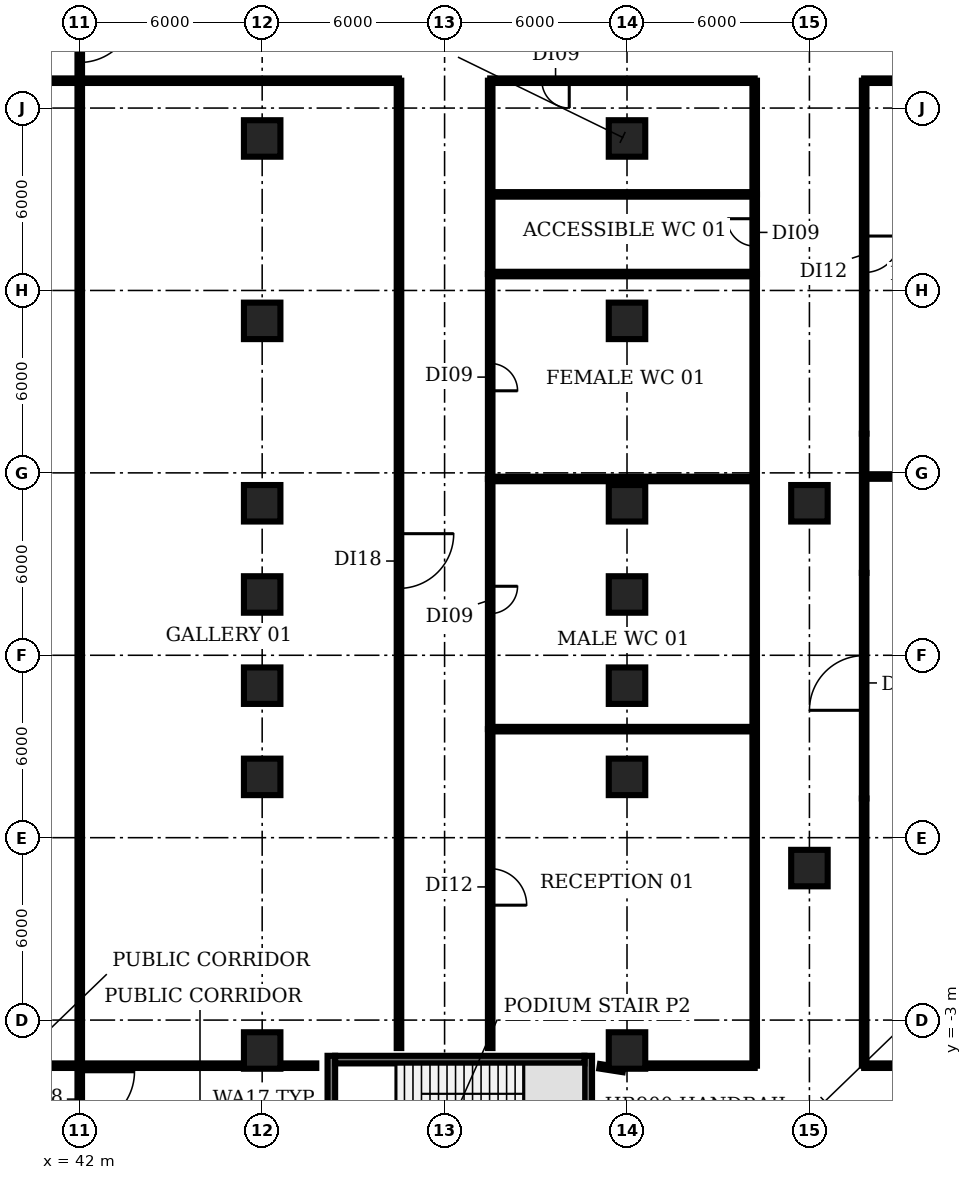
"""IFC4 building model, lengths in metres.
Left out: names, types, materials, properties, quantities, classifications, styles, units other than length and angle.
Written with IfcOpenShell. Run it as: python <this file> out.ifc"""

import sys

from ifc_helpers import new_model, si_unit, direction, frame, frame_2d, origin, origin_2d, place, context, subcontext, project, spatial, rectangle, extrude, element, fill, save


model = new_model("IFC4")
c1 = context("Model", 3, precision=1e-05, world=origin(), true_north=direction((0.0, 1.0)))
c2 = subcontext(c1, "Body", "Model", "MODEL_VIEW")
j1 = project(units=[si_unit("LENGTHUNIT", "METRE"), si_unit("PLANEANGLEUNIT", "RADIAN")], contexts=[c1])
p1 = place(None, origin())
s1 = spatial("IfcSite", under=j1, at=p1, CompositionType="ELEMENT")
p2 = place(p1, origin())
s2 = spatial("IfcBuilding", under=s1, at=p2, CompositionType="ELEMENT")
p3 = place(p2, origin())
s3 = spatial("IfcBuildingStorey", under=s2, at=p3, CompositionType="ELEMENT", Elevation=0.0)
for number, where, z_axis, x_axis in (
    (1, (48.0, -4.0, 0.0), (0.0, 0.0, 1.0), (1.0, 0.0, 0.0)),
    (2, (48.0, 5.0, 0.0), (0.0, 0.0, 1.0), (1.0, 0.0, 0.0)),
    (3, (48.0, 8.0, 0.0), (0.0, 0.0, 1.0), (1.0, 0.0, 0.0)),
    (4, (48.0, 11.0, 0.0), (0.0, 0.0, 1.0), (1.0, 0.0, 0.0)),
    (5, (48.0, 14.0, 0.0), (0.0, 0.0, 1.0), (1.0, 0.0, 0.0)),
    (6, (48.0, 20.0, 0.0), (0.0, 0.0, 1.0), (1.0, 0.0, 0.0)),
    (7, (48.0, 26.0, 0.0), (0.0, 0.0, 1.0), (1.0, 0.0, 0.0)),
    (8, (60.0, -4.0, 0.0), (0.0, 0.0, 1.0), (1.0, 0.0, 0.0)),
    (9, (60.0, 5.0, 0.0), (0.0, 0.0, 1.0), (1.0, 0.0, 0.0)),
    (10, (60.0, 8.0, 0.0), (0.0, 0.0, 1.0), (1.0, 0.0, 0.0)),
    (11, (60.0, 11.0, 0.0), (0.0, 0.0, 1.0), (1.0, 0.0, 0.0)),
    (12, (60.0, 14.0, 0.0), (0.0, 0.0, 1.0), (1.0, 0.0, 0.0)),
    (13, (60.0, 20.0, 0.0), (0.0, 0.0, 1.0), (1.0, 0.0, 0.0)),
    (14, (60.0, 26.0, 0.0), (0.0, 0.0, 1.0), (1.0, 0.0, 0.0)),
    (15, (66.0, 2.0, 0.0), (0.0, 0.0, 1.0), (1.0, 0.0, 0.0)),
    (16, (66.0, 14.0, 0.0), (0.0, 0.0, 1.0), (1.0, 0.0, 0.0)),
):
    element("IfcColumn", number, at=place(p3, frame(where, z_axis=z_axis, x_axis=x_axis)), inside=s3, PredefinedType="COLUMN", context=c2, shape_type="SweptSolid", body=[
        extrude(rectangle(XDim=1.2, YDim=1.2, at=origin_2d()), origin(), (0.0, 0.0, 1.0), 5.65),
    ])
for number, where, z_axis, x_axis in (
    (17, (50.275, -8.825, 0.0), (0.0, 0.0, 1.0), (0.0, 1.0, 0.0)),
    (18, (58.725, -8.825, 0.0), (0.0, 0.0, 1.0), (0.0, 1.0, 0.0)),
):
    element("IfcWall", number, at=place(p3, frame(where, z_axis=z_axis, x_axis=x_axis)), inside=s3, PredefinedType="SHEAR", context=c2, shape_type="SweptSolid", body=[
        extrude(rectangle(XDim=4.65, YDim=0.25, at=frame_2d((2.325, 0.0))), origin(), (0.0, 0.0, 1.0), 5.65),
    ])
p4 = place(p3, frame((50.4, -4.3, 0.0), z_axis=(0.0, 0.0, 1.0), x_axis=(1.0, 0.0, 0.0)))
e19 = element("IfcWall", 19, at=p4, inside=s3, PredefinedType="SHEAR", context=c2, shape_type="SweptSolid", body=[
    extrude(rectangle(XDim=8.2, YDim=0.25, at=frame_2d((4.1, 0.0))), origin(), (0.0, 0.0, 1.0), 5.65),
])
p5 = place(p3, frame((31.5, 27.9, 0.0), z_axis=(0.0, 0.0, 1.0), x_axis=(1.0, 0.0, 0.0)))
e20 = element("IfcWall", 20, at=p5, inside=s3, PredefinedType="PARTITIONING", context=c2, shape_type="SweptSolid", body=[
    extrude(rectangle(XDim=21.0, YDim=0.15, at=frame_2d((10.5, 0.0))), origin(), (0.0, 0.0, 1.0), 4.53),
])
p6 = place(p3, frame((36.46, -4.5, 0.0), z_axis=(0.0, 0.0, 1.0), x_axis=(1.0, 0.0, 0.0)))
e21 = element("IfcWall", 21, at=p6, inside=s3, PredefinedType="PARTITIONING", context=c2, shape_type="SweptSolid", body=[
    extrude(rectangle(XDim=11.08, YDim=0.15, at=frame_2d((5.54, 0.0))), origin(), (0.0, 0.0, 1.0), 4.53),
])
p7 = place(p3, frame((42.0, -4.5, 0.0), z_axis=(0.0, 0.0, 1.0), x_axis=(0.0, -1.0, 0.0)))
e22 = element("IfcWall", 22, at=p7, inside=s3, PredefinedType="PARTITIONING", context=c2, shape_type="SweptSolid", body=[
    extrude(rectangle(XDim=2.2, YDim=0.15, at=frame_2d((1.1, 0.0))), origin(), (0.0, 0.0, 1.0), 4.53),
])
p8 = place(p7, frame((0.2, 0.0, 0.0)))
e23 = element("IfcOpeningElement", 23, at=p8, cuts=e22, PredefinedType="OPENING", context=c2, shape_type="SweptSolid", body=[
    extrude(rectangle(XDim=1.8, YDim=2.1, at=frame_2d((0.9, 1.05))), frame((0.0, 0.085, 0.0), z_axis=(0.0, -1.0, 0.0), x_axis=(1.0, 0.0, 0.0)), (0.0, 0.0, 1.0), 0.17),
])
p9 = place(p3, frame((42.0, -4.5, 0.0), z_axis=(0.0, 0.0, 1.0), x_axis=(0.0, 1.0, 0.0)))
e24 = element("IfcWall", 24, at=p9, inside=s3, PredefinedType="PARTITIONING", context=c2, shape_type="SweptSolid", body=[
    extrude(rectangle(XDim=32.4, YDim=0.15, at=frame_2d((16.2, 0.0))), origin(), (0.0, 0.0, 1.0), 4.53),
])
p10 = place(p3, frame((42.0, 30.9, 0.0), z_axis=(0.0, 0.0, 1.0), x_axis=(0.0, -1.0, 0.0)))
e25 = element("IfcWall", 25, at=p10, inside=s3, PredefinedType="PARTITIONING", context=c2, shape_type="SweptSolid", body=[
    extrude(rectangle(XDim=3.0, YDim=0.15, at=frame_2d((1.5, 0.0))), origin(), (0.0, 0.0, 1.0), 4.53),
])
p11 = place(p10, frame((0.6, 0.0, 0.0)))
e26 = element("IfcOpeningElement", 26, at=p11, cuts=e25, PredefinedType="OPENING", context=c2, shape_type="SweptSolid", body=[
    extrude(rectangle(XDim=1.8, YDim=2.1, at=frame_2d((0.9, 1.05))), frame((0.0, 0.085, 0.0), z_axis=(0.0, -1.0, 0.0), x_axis=(1.0, 0.0, 0.0)), (0.0, 0.0, 1.0), 0.17),
])
p12 = place(p3, frame((48.46, -4.5, 0.0), z_axis=(0.0, 0.0, 1.0), x_axis=(1.0, 0.0, 0.0)))
e27 = element("IfcWall", 27, at=p12, inside=s3, PredefinedType="PARTITIONING", context=c2, shape_type="SweptSolid", body=[
    extrude(rectangle(XDim=1.32, YDim=0.15, at=frame_2d((0.66, 0.0))), origin(), (0.0, 0.0, 1.0), 4.53),
])
p13 = place(p3, frame((52.5, 27.9, 0.0), z_axis=(0.0, 0.0, 1.0), x_axis=(0.0, -1.0, 0.0)))
e28 = element("IfcWall", 28, at=p13, inside=s3, PredefinedType="PARTITIONING", context=c2, shape_type="SweptSolid", body=[
    extrude(rectangle(XDim=31.82, YDim=0.15, at=frame_2d((15.91, 0.0))), origin(), (0.0, 0.0, 1.0), 4.53),
])
p14 = place(p13, frame((14.9, 0.0, 0.0)))
e29 = element("IfcOpeningElement", 29, at=p14, cuts=e28, PredefinedType="OPENING", context=c2, shape_type="SweptSolid", body=[
    extrude(rectangle(XDim=1.8, YDim=2.1, at=frame_2d((0.9, 1.05))), frame((0.0, 0.085, 0.0), z_axis=(0.0, -1.0, 0.0), x_axis=(1.0, 0.0, 0.0)), (0.0, 0.0, 1.0), 0.17),
])
p15 = place(p3, frame((55.5, 6.57, 0.0), z_axis=(0.0, 0.0, 1.0), x_axis=(0.0, -1.0, 0.0)))
e30 = element("IfcWall", 30, at=p15, inside=s3, PredefinedType="PARTITIONING", context=c2, shape_type="SweptSolid", body=[
    extrude(rectangle(XDim=10.49, YDim=0.15, at=frame_2d((5.245, 0.0))), origin(), (0.0, 0.0, 1.0), 4.53),
])
p16 = place(p15, frame((4.59, 0.0, 0.0)))
e31 = element("IfcOpeningElement", 31, at=p16, cuts=e30, PredefinedType="OPENING", context=c2, shape_type="SweptSolid", body=[
    extrude(rectangle(XDim=1.2, YDim=2.1, at=frame_2d((0.6, 1.05))), frame((0.0, 0.085, 0.0), z_axis=(0.0, -1.0, 0.0), x_axis=(1.0, 0.0, 0.0)), (0.0, 0.0, 1.0), 0.17),
])
p17 = place(p3, frame((55.5, 6.57, 0.0), z_axis=(0.0, 0.0, 1.0), x_axis=(1.0, 0.0, 0.0)))
e32 = element("IfcWall", 32, at=p17, inside=s3, PredefinedType="PARTITIONING", context=c2, shape_type="SweptSolid", body=[
    extrude(rectangle(XDim=8.7, YDim=0.15, at=frame_2d((4.35, 0.0))), origin(), (0.0, 0.0, 1.0), 4.53),
])
p18 = place(p3, frame((55.5, 14.8, 0.0), z_axis=(0.0, 0.0, 1.0), x_axis=(0.0, -1.0, 0.0)))
e33 = element("IfcWall", 33, at=p18, inside=s3, PredefinedType="PARTITIONING", context=c2, shape_type="SweptSolid", body=[
    extrude(rectangle(XDim=8.23, YDim=0.15, at=frame_2d((4.115, 0.0))), origin(), (0.0, 0.0, 1.0), 4.53),
])
p19 = place(p18, frame((3.53, 0.0, 0.0)))
e34 = element("IfcOpeningElement", 34, at=p19, cuts=e33, PredefinedType="OPENING", context=c2, shape_type="SweptSolid", body=[
    extrude(rectangle(XDim=0.9, YDim=2.1, at=frame_2d((0.45, 1.05))), frame((0.0, 0.085, 0.0), z_axis=(0.0, -1.0, 0.0), x_axis=(1.0, 0.0, 0.0)), (0.0, 0.0, 1.0), 0.17),
])
p20 = place(p3, frame((55.5, 14.8, 0.0), z_axis=(0.0, 0.0, 1.0), x_axis=(1.0, 0.0, 0.0)))
e35 = element("IfcWall", 35, at=p20, inside=s3, PredefinedType="PARTITIONING", context=c2, shape_type="SweptSolid", body=[
    extrude(rectangle(XDim=8.7, YDim=0.15, at=frame_2d((4.35, 0.0))), origin(), (0.0, 0.0, 1.0), 4.53),
])
p21 = place(p3, frame((55.5, 21.54, 0.0), z_axis=(0.0, 0.0, 1.0), x_axis=(0.0, -1.0, 0.0)))
e36 = element("IfcWall", 36, at=p21, inside=s3, PredefinedType="PARTITIONING", context=c2, shape_type="SweptSolid", body=[
    extrude(rectangle(XDim=6.74, YDim=0.15, at=frame_2d((3.37, 0.0))), origin(), (0.0, 0.0, 1.0), 4.53),
])
p22 = place(p21, frame((2.94, 0.0, 0.0)))
e37 = element("IfcOpeningElement", 37, at=p22, cuts=e36, PredefinedType="OPENING", context=c2, shape_type="SweptSolid", body=[
    extrude(rectangle(XDim=0.9, YDim=2.1, at=frame_2d((0.45, 1.05))), frame((0.0, 0.085, 0.0), z_axis=(0.0, -1.0, 0.0), x_axis=(1.0, 0.0, 0.0)), (0.0, 0.0, 1.0), 0.17),
])
p23 = place(p3, frame((55.5, 21.54, 0.0), z_axis=(0.0, 0.0, 1.0), x_axis=(0.0, 1.0, 0.0)))
e38 = element("IfcWall", 38, at=p23, inside=s3, PredefinedType="PARTITIONING", context=c2, shape_type="SweptSolid", body=[
    extrude(rectangle(XDim=6.36, YDim=0.15, at=frame_2d((3.18, 0.0))), origin(), (0.0, 0.0, 1.0), 4.53),
])
for number, where, z_axis, x_axis in (
    (39, (55.5, 21.54, 0.0), (0.0, 0.0, 1.0), (1.0, 0.0, 0.0)),
    (40, (55.5, 24.16, 0.0), (0.0, 0.0, 1.0), (1.0, 0.0, 0.0)),
):
    element("IfcWall", number, at=place(p3, frame(where, z_axis=z_axis, x_axis=x_axis)), inside=s3, PredefinedType="PARTITIONING", context=c2, shape_type="SweptSolid", body=[
        extrude(rectangle(XDim=8.7, YDim=0.15, at=frame_2d((4.35, 0.0))), origin(), (0.0, 0.0, 1.0), 4.53),
    ])
p24 = place(p3, frame((59.1, -4.52, 0.0), z_axis=(0.0, 0.0, 1.0), x_axis=(0.988098486873, -0.153822560892, 0.0)))
e41 = element("IfcWall", 41, at=p24, inside=s3, PredefinedType="PARTITIONING", context=c2, shape_type="SweptSolid", body=[
    extrude(rectangle(XDim=0.779, YDim=0.15, at=frame_2d((0.39, 0.0))), origin(), (0.0, 0.0, 1.0), 4.53),
])
p25 = place(p3, frame((60.46, -4.5, 0.0), z_axis=(0.0, 0.0, 1.0), x_axis=(1.0, 0.0, 0.0)))
e42 = element("IfcWall", 42, at=p25, inside=s3, PredefinedType="PARTITIONING", context=c2, shape_type="SweptSolid", body=[
    extrude(rectangle(XDim=3.74, YDim=0.15, at=frame_2d((1.87, 0.0))), origin(), (0.0, 0.0, 1.0), 4.53),
])
p26 = place(p3, frame((64.2, -4.5, 0.0), z_axis=(0.0, 0.0, 1.0), x_axis=(0.0, 1.0, 0.0)))
e43 = element("IfcWall", 43, at=p26, inside=s3, PredefinedType="PARTITIONING", context=c2, shape_type="SweptSolid", body=[
    extrude(rectangle(XDim=26.04, YDim=0.15, at=frame_2d((13.02, 0.0))), origin(), (0.0, 0.0, 1.0), 4.53),
])
p27 = place(p3, frame((64.2, 21.54, 0.0), z_axis=(0.0, 0.0, 1.0), x_axis=(0.0, 1.0, 0.0)))
e44 = element("IfcWall", 44, at=p27, inside=s3, PredefinedType="PARTITIONING", context=c2, shape_type="SweptSolid", body=[
    extrude(rectangle(XDim=2.62, YDim=0.15, at=frame_2d((1.31, 0.0))), origin(), (0.0, 0.0, 1.0), 4.53),
])
p28 = place(p27, frame((0.92, 0.0, 0.0)))
e45 = element("IfcOpeningElement", 45, at=p28, cuts=e44, PredefinedType="OPENING", context=c2, shape_type="SweptSolid", body=[
    extrude(rectangle(XDim=0.9, YDim=2.1, at=frame_2d((0.45, 1.05))), frame((0.0, 0.085, 0.0), z_axis=(0.0, -1.0, 0.0), x_axis=(1.0, 0.0, 0.0)), (0.0, 0.0, 1.0), 0.17),
])
p29 = place(p3, frame((64.2, 24.16, 0.0), z_axis=(0.0, 0.0, 1.0), x_axis=(0.0, 1.0, 0.0)))
e46 = element("IfcWall", 46, at=p29, inside=s3, PredefinedType="PARTITIONING", context=c2, shape_type="SweptSolid", body=[
    extrude(rectangle(XDim=3.74, YDim=0.15, at=frame_2d((1.87, 0.0))), origin(), (0.0, 0.0, 1.0), 4.53),
])
p30 = place(p3, frame((64.2, 27.9, 0.0), z_axis=(0.0, 0.0, 1.0), x_axis=(-1.0, 0.0, 0.0)))
e47 = element("IfcWall", 47, at=p30, inside=s3, PredefinedType="PARTITIONING", context=c2, shape_type="SweptSolid", body=[
    extrude(rectangle(XDim=8.7, YDim=0.15, at=frame_2d((4.35, 0.0))), origin(), (0.0, 0.0, 1.0), 4.53),
])
p31 = place(p30, frame((6.1, 0.0, 0.0)))
e48 = element("IfcOpeningElement", 48, at=p31, cuts=e47, PredefinedType="OPENING", context=c2, shape_type="SweptSolid", body=[
    extrude(rectangle(XDim=0.9, YDim=2.1, at=frame_2d((0.45, 1.05))), frame((0.0, 0.085, 0.0), z_axis=(0.0, -1.0, 0.0), x_axis=(1.0, 0.0, 0.0)), (0.0, 0.0, 1.0), 0.17),
])
p32 = place(p3, frame((67.8, -4.5, 0.0), z_axis=(0.0, 0.0, 1.0), x_axis=(0.0, 1.0, 0.0)))
e49 = element("IfcWall", 49, at=p32, inside=s3, PredefinedType="PARTITIONING", context=c2, shape_type="SweptSolid", body=[
    extrude(rectangle(XDim=8.79, YDim=0.15, at=frame_2d((4.395, 0.0))), origin(), (0.0, 0.0, 1.0), 4.53),
])
p33 = place(p3, frame((67.8, -4.5, 0.0), z_axis=(0.0, 0.0, 1.0), x_axis=(1.0, 0.0, 0.0)))
e50 = element("IfcWall", 50, at=p33, inside=s3, PredefinedType="PARTITIONING", context=c2, shape_type="SweptSolid", body=[
    extrude(rectangle(XDim=3.74, YDim=0.15, at=frame_2d((1.87, 0.0))), origin(), (0.0, 0.0, 1.0), 4.53),
])
p34 = place(p3, frame((67.8, 4.29, 0.0), z_axis=(0.0, 0.0, 1.0), x_axis=(0.0, 1.0, 0.0)))
e51 = element("IfcWall", 51, at=p34, inside=s3, PredefinedType="PARTITIONING", context=c2, shape_type="SweptSolid", body=[
    extrude(rectangle(XDim=7.42, YDim=0.15, at=frame_2d((3.71, 0.0))), origin(), (0.0, 0.0, 1.0), 4.53),
])
p35 = place(p34, frame((2.9, 0.0, 0.0)))
e52 = element("IfcOpeningElement", 52, at=p35, cuts=e51, PredefinedType="OPENING", context=c2, shape_type="SweptSolid", body=[
    extrude(rectangle(XDim=1.8, YDim=2.1, at=frame_2d((0.9, 1.05))), frame((0.0, 0.085, 0.0), z_axis=(0.0, -1.0, 0.0), x_axis=(1.0, 0.0, 0.0)), (0.0, 0.0, 1.0), 0.17),
])
p36 = place(p3, frame((67.8, 11.71, 0.0), z_axis=(0.0, 0.0, 1.0), x_axis=(0.0, 1.0, 0.0)))
e53 = element("IfcWall", 53, at=p36, inside=s3, PredefinedType="PARTITIONING", context=c2, shape_type="SweptSolid", body=[
    extrude(rectangle(XDim=4.58, YDim=0.15, at=frame_2d((2.29, 0.0))), origin(), (0.0, 0.0, 1.0), 4.53),
])
p37 = place(p3, frame((67.8, 14.88, 0.0), z_axis=(0.0, 0.0, 1.0), x_axis=(1.0, 0.0, 0.0)))
e54 = element("IfcWall", 54, at=p37, inside=s3, PredefinedType="PARTITIONING", context=c2, shape_type="SweptSolid", body=[
    extrude(rectangle(XDim=10.2, YDim=0.15, at=frame_2d((5.1, 0.0))), origin(), (0.0, 0.0, 1.0), 4.53),
])
p38 = place(p3, frame((67.8, 27.9, 0.0), z_axis=(0.0, 0.0, 1.0), x_axis=(0.0, -1.0, 0.0)))
e55 = element("IfcWall", 55, at=p38, inside=s3, PredefinedType="PARTITIONING", context=c2, shape_type="SweptSolid", body=[
    extrude(rectangle(XDim=11.61, YDim=0.15, at=frame_2d((5.805, 0.0))), origin(), (0.0, 0.0, 1.0), 4.53),
])
p39 = place(p38, frame((5.11, 0.0, 0.0)))
e56 = element("IfcOpeningElement", 56, at=p39, cuts=e55, PredefinedType="OPENING", context=c2, shape_type="SweptSolid", body=[
    extrude(rectangle(XDim=1.2, YDim=2.1, at=frame_2d((0.6, 1.05))), frame((0.0, 0.085, 0.0), z_axis=(0.0, -1.0, 0.0), x_axis=(1.0, 0.0, 0.0)), (0.0, 0.0, 1.0), 0.17),
])
p40 = place(p3, frame((67.8, 27.9, 0.0), z_axis=(0.0, 0.0, 1.0), x_axis=(1.0, 0.0, 0.0)))
e57 = element("IfcWall", 57, at=p40, inside=s3, PredefinedType="PARTITIONING", context=c2, shape_type="SweptSolid", body=[
    extrude(rectangle(XDim=10.2, YDim=0.15, at=frame_2d((5.1, 0.0))), origin(), (0.0, 0.0, 1.0), 4.53),
])
p41 = place(p8, origin())
e58 = element("IfcDoor", 58, at=p41, inside=s3, OperationType="SINGLE_SWING_LEFT", PredefinedType="DOOR", context=c2, shape_type="SweptSolid", body=[
    extrude(rectangle(XDim=1.8, YDim=2.1, at=frame_2d((0.9, 1.05))), frame((0.0, 0.025, 0.0), z_axis=(0.0, -1.0, 0.0), x_axis=(1.0, 0.0, 0.0)), (0.0, 0.0, 1.0), 0.05),
])
fill(e23, e58)
p42 = place(p11, origin())
e59 = element("IfcDoor", 59, at=p42, inside=s3, OperationType="SINGLE_SWING_LEFT", PredefinedType="DOOR", context=c2, shape_type="SweptSolid", body=[
    extrude(rectangle(XDim=1.8, YDim=2.1, at=frame_2d((0.9, 1.05))), frame((0.0, 0.025, 0.0), z_axis=(0.0, -1.0, 0.0), x_axis=(1.0, 0.0, 0.0)), (0.0, 0.0, 1.0), 0.05),
])
fill(e26, e59)
p43 = place(p14, origin())
e60 = element("IfcDoor", 60, at=p43, inside=s3, OperationType="SINGLE_SWING_LEFT", PredefinedType="DOOR", context=c2, shape_type="SweptSolid", body=[
    extrude(rectangle(XDim=1.8, YDim=2.1, at=frame_2d((0.9, 1.05))), frame((0.0, 0.025, 0.0), z_axis=(0.0, -1.0, 0.0), x_axis=(1.0, 0.0, 0.0)), (0.0, 0.0, 1.0), 0.05),
])
fill(e29, e60)
p44 = place(p16, origin())
e61 = element("IfcDoor", 61, at=p44, inside=s3, OperationType="SINGLE_SWING_RIGHT", PredefinedType="DOOR", context=c2, shape_type="SweptSolid", body=[
    extrude(rectangle(XDim=1.2, YDim=2.1, at=frame_2d((0.6, 1.05))), frame((0.0, 0.025, 0.0), z_axis=(0.0, -1.0, 0.0), x_axis=(1.0, 0.0, 0.0)), (0.0, 0.0, 1.0), 0.05),
])
fill(e31, e61)
p45 = place(p19, origin())
e62 = element("IfcDoor", 62, at=p45, inside=s3, OperationType="SINGLE_SWING_LEFT", PredefinedType="DOOR", context=c2, shape_type="SweptSolid", body=[
    extrude(rectangle(XDim=0.9, YDim=2.1, at=frame_2d((0.45, 1.05))), frame((0.0, 0.025, 0.0), z_axis=(0.0, -1.0, 0.0), x_axis=(1.0, 0.0, 0.0)), (0.0, 0.0, 1.0), 0.05),
])
fill(e34, e62)
p46 = place(p22, origin())
e63 = element("IfcDoor", 63, at=p46, inside=s3, OperationType="SINGLE_SWING_RIGHT", PredefinedType="DOOR", context=c2, shape_type="SweptSolid", body=[
    extrude(rectangle(XDim=0.9, YDim=2.1, at=frame_2d((0.45, 1.05))), frame((0.0, 0.025, 0.0), z_axis=(0.0, -1.0, 0.0), x_axis=(1.0, 0.0, 0.0)), (0.0, 0.0, 1.0), 0.05),
])
fill(e37, e63)
p47 = place(p28, origin())
e64 = element("IfcDoor", 64, at=p47, inside=s3, OperationType="SINGLE_SWING_RIGHT", PredefinedType="DOOR", context=c2, shape_type="SweptSolid", body=[
    extrude(rectangle(XDim=0.9, YDim=2.1, at=frame_2d((0.45, 1.05))), frame((0.0, 0.025, 0.0), z_axis=(0.0, -1.0, 0.0), x_axis=(1.0, 0.0, 0.0)), (0.0, 0.0, 1.0), 0.05),
])
fill(e45, e64)
p48 = place(p31, origin())
e65 = element("IfcDoor", 65, at=p48, inside=s3, OperationType="SINGLE_SWING_LEFT", PredefinedType="DOOR", context=c2, shape_type="SweptSolid", body=[
    extrude(rectangle(XDim=0.9, YDim=2.1, at=frame_2d((0.45, 1.05))), frame((0.0, 0.025, 0.0), z_axis=(0.0, -1.0, 0.0), x_axis=(1.0, 0.0, 0.0)), (0.0, 0.0, 1.0), 0.05),
])
fill(e48, e65)
p49 = place(p35, origin())
e66 = element("IfcDoor", 66, at=p49, inside=s3, OperationType="SINGLE_SWING_LEFT", PredefinedType="DOOR", context=c2, shape_type="SweptSolid", body=[
    extrude(rectangle(XDim=1.8, YDim=2.1, at=frame_2d((0.9, 1.05))), frame((0.0, 0.025, 0.0), z_axis=(0.0, -1.0, 0.0), x_axis=(1.0, 0.0, 0.0)), (0.0, 0.0, 1.0), 0.05),
])
fill(e52, e66)
p50 = place(p39, origin())
e67 = element("IfcDoor", 67, at=p50, inside=s3, OperationType="SINGLE_SWING_LEFT", PredefinedType="DOOR", context=c2, shape_type="SweptSolid", body=[
    extrude(rectangle(XDim=1.2, YDim=2.1, at=frame_2d((0.6, 1.05))), frame((0.0, 0.025, 0.0), z_axis=(0.0, -1.0, 0.0), x_axis=(1.0, 0.0, 0.0)), (0.0, 0.0, 1.0), 0.05),
])
fill(e56, e67)
save(model, sys.argv[1])
